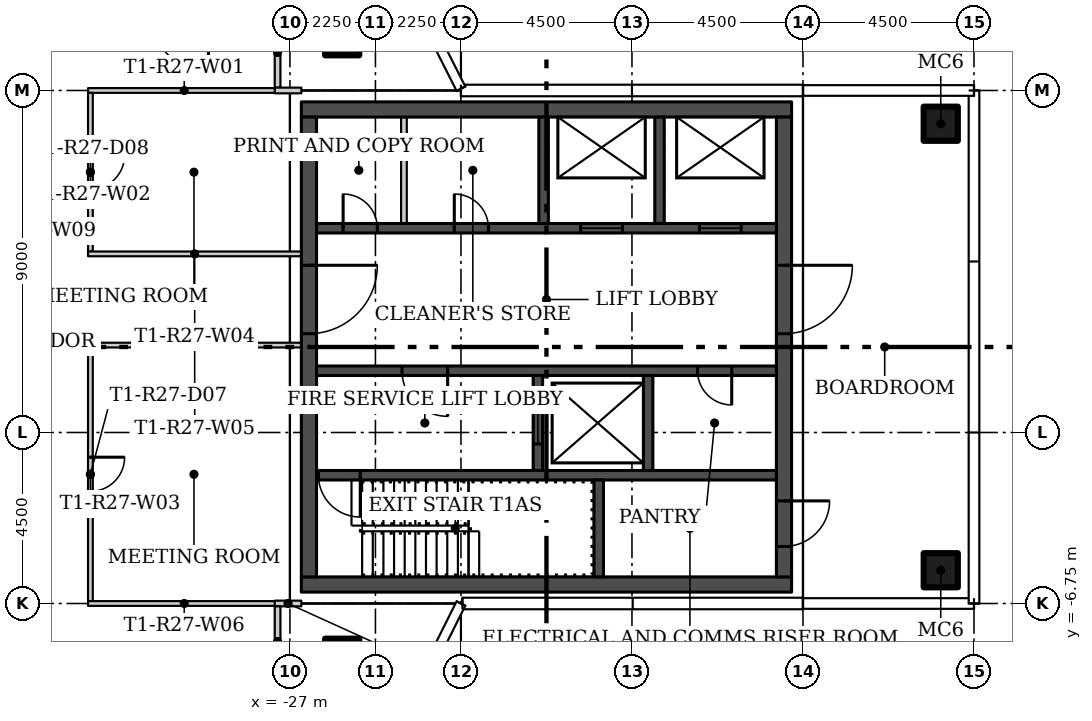
"""IFC4 building model, lengths in metres.
Left out: names, types, materials, properties, quantities, classifications, styles, units other than length and angle.
Written with IfcOpenShell. Run it as: python <this file> out.ifc"""

import sys

from ifc_helpers import new_model, si_unit, direction, frame, frame_2d, origin, origin_2d, place, context, subcontext, project, spatial, rectangle, hollow_rectangle, extrude, element, fill, save


model = new_model("IFC4")
c1 = context("Model", 3, precision=1e-05, world=origin(), true_north=direction((0.0, 1.0)))
c2 = subcontext(c1, "Body", "Model", "MODEL_VIEW")
j1 = project(units=[si_unit("LENGTHUNIT", "METRE"), si_unit("PLANEANGLEUNIT", "RADIAN")], contexts=[c1])
p1 = place(None, origin())
s1 = spatial("IfcSite", under=j1, at=p1, CompositionType="ELEMENT")
p2 = place(p1, origin())
s2 = spatial("IfcBuilding", under=s1, at=p2, CompositionType="ELEMENT")
p3 = place(p2, frame((0.0, 0.0, 249.9)))
s3 = spatial("IfcBuildingStorey", under=s2, at=p3, CompositionType="ELEMENT", Elevation=249.9)
for number, where in (
    (1, (-25.625, 8.125, 0.0)),
    (2, (-25.625, -8.125, 0.0)),
    (3, (-9.875, -5.875, 0.0)),
    (4, (-9.875, 5.875, 0.0)),
):
    element("IfcColumn", number, at=place(p3, frame(where)), inside=s3, PredefinedType="COLUMN", context=c2, shape_type="SweptSolid", body=[
        extrude(hollow_rectangle(XDim=0.9, YDim=0.9, WallThickness=0.036, at=origin_2d()), origin(), (0.0, 0.0, 1.0), 3.55),
    ])
p4 = place(p3, frame((-27.25, 6.75, 0.0), z_axis=(0.0, 0.0, 1.0), x_axis=(-1.0, 0.0, 0.0)))
e5 = element("IfcWall", 5, at=p4, inside=s3, PredefinedType="PARTITIONING", context=c2, shape_type="SweptSolid", body=[
    extrude(rectangle(XDim=5.062, YDim=0.125, at=frame_2d((2.531, 0.0))), origin(), (0.0, 0.0, 1.0), 3.55),
])
p5 = place(p3, frame((-32.25, 6.688, 0.0), z_axis=(0.0, 0.0, 1.0), x_axis=(0.0, -1.0, 0.0)))
e6 = element("IfcWall", 6, at=p5, inside=s3, PredefinedType="PARTITIONING", context=c2, shape_type="SweptSolid", body=[
    extrude(rectangle(XDim=4.175, YDim=0.125, at=frame_2d((2.087, 0.0))), origin(), (0.0, 0.0, 1.0), 3.55),
])
p6 = place(p5, frame((1.637, 0.0, 0.0)))
e7 = element("IfcOpeningElement", 7, at=p6, cuts=e6, PredefinedType="OPENING", context=c2, shape_type="SweptSolid", body=[
    extrude(rectangle(XDim=0.9, YDim=2.1, at=frame_2d((0.45, 1.05))), frame((0.0, 0.073, 0.0), z_axis=(0.0, -1.0, 0.0), x_axis=(1.0, 0.0, 0.0)), (0.0, 0.0, 1.0), 0.145),
])
p7 = place(p3, frame((-32.25, -0.013, 0.0), z_axis=(0.0, 0.0, 1.0), x_axis=(0.0, -1.0, 0.0)))
e8 = element("IfcWall", 8, at=p7, inside=s3, PredefinedType="PARTITIONING", context=c2, shape_type="SweptSolid", body=[
    extrude(rectangle(XDim=6.675, YDim=0.125, at=frame_2d((3.337, 0.0))), origin(), (0.0, 0.0, 1.0), 3.55),
])
p8 = place(p7, frame((2.887, 0.0, 0.0)))
e9 = element("IfcOpeningElement", 9, at=p8, cuts=e8, PredefinedType="OPENING", context=c2, shape_type="SweptSolid", body=[
    extrude(rectangle(XDim=0.9, YDim=2.1, at=frame_2d((0.45, 1.05))), frame((0.0, 0.073, 0.0), z_axis=(0.0, -1.0, 0.0), x_axis=(1.0, 0.0, 0.0)), (0.0, 0.0, 1.0), 0.145),
])
p9 = place(p3, frame((-32.312, 2.45, 0.0)))
e10 = element("IfcWall", 10, at=p9, inside=s3, PredefinedType="PARTITIONING", context=c2, shape_type="SweptSolid", body=[
    extrude(rectangle(XDim=5.613, YDim=0.125, at=frame_2d((2.806, 0.0))), origin(), (0.0, 0.0, 1.0), 3.55),
])
p10 = place(p3, frame((-26.7, 0.05, 0.0), z_axis=(0.0, 0.0, 1.0), x_axis=(-1.0, 0.0, 0.0)))
e11 = element("IfcWall", 11, at=p10, inside=s3, PredefinedType="PARTITIONING", context=c2, shape_type="SweptSolid", body=[
    extrude(rectangle(XDim=5.613, YDim=0.125, at=frame_2d((2.806, 0.0))), origin(), (0.0, 0.0, 1.0), 3.55),
])
p11 = place(p3, frame((-32.312, -6.75, 0.0)))
e12 = element("IfcWall", 12, at=p11, inside=s3, PredefinedType="PARTITIONING", context=c2, shape_type="SweptSolid", body=[
    extrude(rectangle(XDim=5.062, YDim=0.125, at=frame_2d((2.531, 0.0))), origin(), (0.0, 0.0, 1.0), 3.55),
])
p12 = place(p3, frame((-27.4, -6.75, 0.0)))
e13 = element("IfcWall", 13, at=p12, inside=s3, PredefinedType="PARTITIONING", context=c2, shape_type="SweptSolid", body=[
    extrude(rectangle(XDim=0.7, YDim=0.15, at=frame_2d((0.35, 0.0))), origin(), (0.0, 0.0, 1.0), 3.55),
])
for number, where, z_axis, x_axis in (
    (14, (-27.325, -8.675, 0.0), (0.0, 0.0, 1.0), (0.0, 1.0, 0.0)),
    (15, (-27.325, 6.825, 0.0), (0.0, 0.0, 1.0), (0.0, 1.0, 0.0)),
):
    element("IfcWall", number, at=place(p3, frame(where, z_axis=z_axis, x_axis=x_axis)), inside=s3, PredefinedType="PARTITIONING", context=c2, shape_type="SweptSolid", body=[
        extrude(rectangle(XDim=1.85, YDim=0.15, at=frame_2d((0.925, 0.0))), origin(), (0.0, 0.0, 1.0), 3.55),
    ])
p13 = place(p3, frame((-26.7, 6.75, 0.0), z_axis=(0.0, 0.0, 1.0), x_axis=(-1.0, 0.0, 0.0)))
e16 = element("IfcWall", 16, at=p13, inside=s3, PredefinedType="PARTITIONING", context=c2, shape_type="SweptSolid", body=[
    extrude(rectangle(XDim=0.7, YDim=0.15, at=frame_2d((0.35, 0.0))), origin(), (0.0, 0.0, 1.0), 3.55),
])
for number, where in (
    (17, (-26.7, -6.25, 0.0)),
    (18, (-26.7, 6.25, 0.0)),
):
    element("IfcWall", number, at=place(p3, frame(where)), inside=s3, PredefinedType="SHEAR", context=c2, shape_type="SweptSolid", body=[
        extrude(rectangle(XDim=12.9, YDim=0.4, at=frame_2d((6.45, 0.0))), origin(), (0.0, 0.0, 1.0), 3.55),
    ])
p14 = place(p3, frame((-26.5, 6.05, 0.0), z_axis=(0.0, 0.0, 1.0), x_axis=(0.0, -1.0, 0.0)))
e19 = element("IfcWall", 19, at=p14, inside=s3, PredefinedType="SHEAR", context=c2, shape_type="SweptSolid", body=[
    extrude(rectangle(XDim=12.1, YDim=0.4, at=frame_2d((6.05, 0.0))), origin(), (0.0, 0.0, 1.0), 3.55),
])
p15 = place(p14, frame((3.9, 0.0, 0.0)))
e20 = element("IfcOpeningElement", 20, at=p15, cuts=e19, PredefinedType="OPENING", context=c2, shape_type="SweptSolid", body=[
    extrude(rectangle(XDim=1.8, YDim=2.4, at=frame_2d((0.9, 1.2))), frame((0.0, 0.21, 0.0), z_axis=(0.0, -1.0, 0.0), x_axis=(1.0, 0.0, 0.0)), (0.0, 0.0, 1.0), 0.42),
])
p16 = place(p3, frame((-14.0, 6.05, 0.0), z_axis=(0.0, 0.0, 1.0), x_axis=(0.0, -1.0, 0.0)))
e21 = element("IfcWall", 21, at=p16, inside=s3, PredefinedType="SHEAR", context=c2, shape_type="SweptSolid", body=[
    extrude(rectangle(XDim=12.1, YDim=0.4, at=frame_2d((6.05, 0.0))), origin(), (0.0, 0.0, 1.0), 3.55),
])
p17 = place(p16, frame((10.1, 0.0, 0.0)))
e22 = element("IfcOpeningElement", 22, at=p17, cuts=e21, PredefinedType="OPENING", context=c2, shape_type="SweptSolid", body=[
    extrude(rectangle(XDim=1.2, YDim=2.1, at=frame_2d((0.6, 1.05))), frame((0.0, 0.21, 0.0), z_axis=(0.0, -1.0, 0.0), x_axis=(1.0, 0.0, 0.0)), (0.0, 0.0, 1.0), 0.42),
])
p18 = place(p16, frame((3.9, 0.0, 0.0)))
e23 = element("IfcOpeningElement", 23, at=p18, cuts=e21, PredefinedType="OPENING", context=c2, shape_type="SweptSolid", body=[
    extrude(rectangle(XDim=1.8, YDim=2.4, at=frame_2d((0.9, 1.2))), frame((0.0, 0.21, 0.0), z_axis=(0.0, -1.0, 0.0), x_axis=(1.0, 0.0, 0.0)), (0.0, 0.0, 1.0), 0.42),
])
p19 = place(p3, frame((-14.2, -3.375, 0.0), z_axis=(0.0, 0.0, 1.0), x_axis=(-1.0, 0.0, 0.0)))
e24 = element("IfcWall", 24, at=p19, inside=s3, PredefinedType="SHEAR", context=c2, shape_type="SweptSolid", body=[
    extrude(rectangle(XDim=12.1, YDim=0.25, at=frame_2d((6.05, 0.0))), origin(), (0.0, 0.0, 1.0), 3.55),
])
p20 = place(p19, frame((10.95, 0.0, 0.0)))
e25 = element("IfcOpeningElement", 25, at=p20, cuts=e24, PredefinedType="OPENING", context=c2, shape_type="SweptSolid", body=[
    extrude(rectangle(XDim=1.1, YDim=2.1, at=frame_2d((0.55, 1.05))), frame((0.0, 0.135, 0.0), z_axis=(0.0, -1.0, 0.0), x_axis=(1.0, 0.0, 0.0)), (0.0, 0.0, 1.0), 0.27),
])
p21 = place(p3, frame((-18.875, -6.05, 0.0), z_axis=(0.0, 0.0, 1.0), x_axis=(0.0, 1.0, 0.0)))
e26 = element("IfcWall", 26, at=p21, inside=s3, PredefinedType="SHEAR", context=c2, shape_type="SweptSolid", body=[
    extrude(rectangle(XDim=2.55, YDim=0.25, at=frame_2d((1.275, 0.0))), origin(), (0.0, 0.0, 1.0), 3.55),
])
p22 = place(p3, frame((-14.2, -0.625, 0.0), z_axis=(0.0, 0.0, 1.0), x_axis=(-1.0, 0.0, 0.0)))
e27 = element("IfcWall", 27, at=p22, inside=s3, PredefinedType="SHEAR", context=c2, shape_type="SweptSolid", body=[
    extrude(rectangle(XDim=12.1, YDim=0.25, at=frame_2d((6.05, 0.0))), origin(), (0.0, 0.0, 1.0), 3.55),
])
p23 = place(p22, frame((8.65, 0.0, 0.0)))
e28 = element("IfcOpeningElement", 28, at=p23, cuts=e27, PredefinedType="OPENING", context=c2, shape_type="SweptSolid", body=[
    extrude(rectangle(XDim=1.2, YDim=2.1, at=frame_2d((0.6, 1.05))), frame((0.0, 0.135, 0.0), z_axis=(0.0, -1.0, 0.0), x_axis=(1.0, 0.0, 0.0)), (0.0, 0.0, 1.0), 0.27),
])
p24 = place(p22, frame((1.175, 0.0, 0.0)))
e29 = element("IfcOpeningElement", 29, at=p24, cuts=e27, PredefinedType="OPENING", context=c2, shape_type="SweptSolid", body=[
    extrude(rectangle(XDim=0.9, YDim=2.1, at=frame_2d((0.45, 1.05))), frame((0.0, 0.135, 0.0), z_axis=(0.0, -1.0, 0.0), x_axis=(1.0, 0.0, 0.0)), (0.0, 0.0, 1.0), 0.27),
])
p25 = place(p3, frame((-20.475, -3.25, 0.0), z_axis=(0.0, 0.0, 1.0), x_axis=(0.0, 1.0, 0.0)))
e30 = element("IfcWall", 30, at=p25, inside=s3, PredefinedType="SHEAR", context=c2, shape_type="SweptSolid", body=[
    extrude(rectangle(XDim=2.5, YDim=0.25, at=frame_2d((1.25, 0.0))), origin(), (0.0, 0.0, 1.0), 3.55),
])
p26 = place(p25, frame((0.7, 0.0, 0.0)))
e31 = element("IfcOpeningElement", 31, at=p26, cuts=e30, PredefinedType="OPENING", context=c2, shape_type="SweptSolid", body=[
    extrude(rectangle(XDim=1.1, YDim=2.1, at=frame_2d((0.55, 1.05))), frame((0.0, 0.135, 0.0), z_axis=(0.0, -1.0, 0.0), x_axis=(1.0, 0.0, 0.0)), (0.0, 0.0, 1.0), 0.27),
])
p27 = place(p3, frame((-17.575, -3.25, 0.0), z_axis=(0.0, 0.0, 1.0), x_axis=(0.0, 1.0, 0.0)))
e32 = element("IfcWall", 32, at=p27, inside=s3, PredefinedType="SHEAR", context=c2, shape_type="SweptSolid", body=[
    extrude(rectangle(XDim=2.5, YDim=0.25, at=frame_2d((1.25, 0.0))), origin(), (0.0, 0.0, 1.0), 3.55),
])
p28 = place(p3, frame((-26.3, 3.125, 0.0)))
e33 = element("IfcWall", 33, at=p28, inside=s3, PredefinedType="SHEAR", context=c2, shape_type="SweptSolid", body=[
    extrude(rectangle(XDim=12.1, YDim=0.25, at=frame_2d((6.05, 0.0))), origin(), (0.0, 0.0, 1.0), 3.55),
])
p29 = place(p28, frame((6.95, 0.0, 0.0)))
e34 = element("IfcOpeningElement", 34, at=p29, cuts=e33, PredefinedType="OPENING", context=c2, shape_type="SweptSolid", body=[
    extrude(rectangle(XDim=1.1, YDim=2.1, at=frame_2d((0.55, 1.05))), frame((0.0, 0.135, 0.0), z_axis=(0.0, -1.0, 0.0), x_axis=(1.0, 0.0, 0.0)), (0.0, 0.0, 1.0), 0.27),
])
p30 = place(p28, frame((10.075, 0.0, 0.0)))
e35 = element("IfcOpeningElement", 35, at=p30, cuts=e33, PredefinedType="OPENING", context=c2, shape_type="SweptSolid", body=[
    extrude(rectangle(XDim=1.1, YDim=2.1, at=frame_2d((0.55, 1.05))), frame((0.0, 0.135, 0.0), z_axis=(0.0, -1.0, 0.0), x_axis=(1.0, 0.0, 0.0)), (0.0, 0.0, 1.0), 0.27),
])
p31 = place(p28, frame((0.7, 0.0, 0.0)))
e36 = element("IfcOpeningElement", 36, at=p31, cuts=e33, PredefinedType="OPENING", context=c2, shape_type="SweptSolid", body=[
    extrude(rectangle(XDim=0.9, YDim=2.1, at=frame_2d((0.45, 1.05))), frame((0.0, 0.135, 0.0), z_axis=(0.0, -1.0, 0.0), x_axis=(1.0, 0.0, 0.0)), (0.0, 0.0, 1.0), 0.27),
])
p32 = place(p28, frame((3.625, 0.0, 0.0)))
e37 = element("IfcOpeningElement", 37, at=p32, cuts=e33, PredefinedType="OPENING", context=c2, shape_type="SweptSolid", body=[
    extrude(rectangle(XDim=0.9, YDim=2.1, at=frame_2d((0.45, 1.05))), frame((0.0, 0.135, 0.0), z_axis=(0.0, -1.0, 0.0), x_axis=(1.0, 0.0, 0.0)), (0.0, 0.0, 1.0), 0.27),
])
for number, where, z_axis, x_axis in (
    (38, (-20.325, 3.25, 0.0), (0.0, 0.0, 1.0), (0.0, 1.0, 0.0)),
    (39, (-17.275, 3.25, 0.0), (0.0, 0.0, 1.0), (0.0, 1.0, 0.0)),
):
    element("IfcWall", number, at=place(p3, frame(where, z_axis=z_axis, x_axis=x_axis)), inside=s3, PredefinedType="SHEAR", context=c2, shape_type="SweptSolid", body=[
        extrude(rectangle(XDim=2.8, YDim=0.25, at=frame_2d((1.4, 0.0))), origin(), (0.0, 0.0, 1.0), 3.55),
    ])
p33 = place(p3, frame((-24.0, 3.25, 0.0), z_axis=(0.0, 0.0, 1.0), x_axis=(0.0, 1.0, 0.0)))
e40 = element("IfcWall", 40, at=p33, inside=s3, PredefinedType="PARTITIONING", context=c2, shape_type="SweptSolid", body=[
    extrude(rectangle(XDim=2.8, YDim=0.15, at=frame_2d((1.4, 0.0))), origin(), (0.0, 0.0, 1.0), 3.55),
])
p34 = place(p8, origin())
e41 = element("IfcDoor", 41, at=p34, inside=s3, OperationType="SINGLE_SWING_LEFT", PredefinedType="DOOR", context=c2, shape_type="SweptSolid", body=[
    extrude(rectangle(XDim=0.9, YDim=2.1, at=frame_2d((0.45, 1.05))), frame((0.0, 0.025, 0.0), z_axis=(0.0, -1.0, 0.0), x_axis=(1.0, 0.0, 0.0)), (0.0, 0.0, 1.0), 0.05),
])
fill(e9, e41)
p35 = place(p6, origin())
e42 = element("IfcDoor", 42, at=p35, inside=s3, OperationType="SINGLE_SWING_LEFT", PredefinedType="DOOR", context=c2, shape_type="SweptSolid", body=[
    extrude(rectangle(XDim=0.9, YDim=2.1, at=frame_2d((0.45, 1.05))), frame((0.0, 0.025, 0.0), z_axis=(0.0, -1.0, 0.0), x_axis=(1.0, 0.0, 0.0)), (0.0, 0.0, 1.0), 0.05),
])
fill(e7, e42)
p36 = place(p15, origin())
e43 = element("IfcDoor", 43, at=p36, inside=s3, OperationType="DOUBLE_DOOR_SINGLE_SWING", PredefinedType="DOOR", context=c2, shape_type="SweptSolid", body=[
    extrude(rectangle(XDim=1.8, YDim=2.4, at=frame_2d((0.9, 1.2))), frame((0.0, 0.025, 0.0), z_axis=(0.0, -1.0, 0.0), x_axis=(1.0, 0.0, 0.0)), (0.0, 0.0, 1.0), 0.05),
])
fill(e20, e43)
p37 = place(p17, origin())
e44 = element("IfcDoor", 44, at=p37, inside=s3, OperationType="SINGLE_SWING_RIGHT", PredefinedType="DOOR", context=c2, shape_type="SweptSolid", body=[
    extrude(rectangle(XDim=1.2, YDim=2.1, at=frame_2d((0.6, 1.05))), frame((0.0, 0.025, 0.0), z_axis=(0.0, -1.0, 0.0), x_axis=(1.0, 0.0, 0.0)), (0.0, 0.0, 1.0), 0.05),
])
fill(e22, e44)
p38 = place(p18, origin())
e45 = element("IfcDoor", 45, at=p38, inside=s3, OperationType="DOUBLE_DOOR_SINGLE_SWING", PredefinedType="DOOR", context=c2, shape_type="SweptSolid", body=[
    extrude(rectangle(XDim=1.8, YDim=2.4, at=frame_2d((0.9, 1.2))), frame((0.0, 0.025, 0.0), z_axis=(0.0, -1.0, 0.0), x_axis=(1.0, 0.0, 0.0)), (0.0, 0.0, 1.0), 0.05),
])
fill(e23, e45)
p39 = place(p20, origin())
e46 = element("IfcDoor", 46, at=p39, inside=s3, OperationType="SINGLE_SWING_RIGHT", PredefinedType="DOOR", context=c2, shape_type="SweptSolid", body=[
    extrude(rectangle(XDim=1.1, YDim=2.1, at=frame_2d((0.55, 1.05))), frame((0.0, 0.025, 0.0), z_axis=(0.0, -1.0, 0.0), x_axis=(1.0, 0.0, 0.0)), (0.0, 0.0, 1.0), 0.05),
])
fill(e25, e46)
p40 = place(p23, origin())
e47 = element("IfcDoor", 47, at=p40, inside=s3, OperationType="SINGLE_SWING_RIGHT", PredefinedType="DOOR", context=c2, shape_type="SweptSolid", body=[
    extrude(rectangle(XDim=1.2, YDim=2.1, at=frame_2d((0.6, 1.05))), frame((0.0, 0.025, 0.0), z_axis=(0.0, -1.0, 0.0), x_axis=(1.0, 0.0, 0.0)), (0.0, 0.0, 1.0), 0.05),
])
fill(e28, e47)
p41 = place(p24, origin())
e48 = element("IfcDoor", 48, at=p41, inside=s3, OperationType="SINGLE_SWING_LEFT", PredefinedType="DOOR", context=c2, shape_type="SweptSolid", body=[
    extrude(rectangle(XDim=0.9, YDim=2.1, at=frame_2d((0.45, 1.05))), frame((0.0, 0.025, 0.0), z_axis=(0.0, -1.0, 0.0), x_axis=(1.0, 0.0, 0.0)), (0.0, 0.0, 1.0), 0.05),
])
fill(e29, e48)
p42 = place(p26, origin())
e49 = element("IfcDoor", 49, at=p42, inside=s3, OperationType="SLIDING_TO_LEFT", PredefinedType="DOOR", context=c2, shape_type="SweptSolid", body=[
    extrude(rectangle(XDim=1.1, YDim=2.1, at=frame_2d((0.55, 1.05))), frame((0.0, 0.025, 0.0), z_axis=(0.0, -1.0, 0.0), x_axis=(1.0, 0.0, 0.0)), (0.0, 0.0, 1.0), 0.05),
])
fill(e31, e49)
p43 = place(p29, origin())
e50 = element("IfcDoor", 50, at=p43, inside=s3, OperationType="SLIDING_TO_LEFT", PredefinedType="DOOR", context=c2, shape_type="SweptSolid", body=[
    extrude(rectangle(XDim=1.1, YDim=2.1, at=frame_2d((0.55, 1.05))), frame((0.0, 0.025, 0.0), z_axis=(0.0, -1.0, 0.0), x_axis=(1.0, 0.0, 0.0)), (0.0, 0.0, 1.0), 0.05),
])
fill(e34, e50)
p44 = place(p30, origin())
e51 = element("IfcDoor", 51, at=p44, inside=s3, OperationType="SLIDING_TO_LEFT", PredefinedType="DOOR", context=c2, shape_type="SweptSolid", body=[
    extrude(rectangle(XDim=1.1, YDim=2.1, at=frame_2d((0.55, 1.05))), frame((0.0, 0.025, 0.0), z_axis=(0.0, -1.0, 0.0), x_axis=(1.0, 0.0, 0.0)), (0.0, 0.0, 1.0), 0.05),
])
fill(e35, e51)
p45 = place(p31, origin())
e52 = element("IfcDoor", 52, at=p45, inside=s3, OperationType="SINGLE_SWING_LEFT", PredefinedType="DOOR", context=c2, shape_type="SweptSolid", body=[
    extrude(rectangle(XDim=0.9, YDim=2.1, at=frame_2d((0.45, 1.05))), frame((0.0, 0.025, 0.0), z_axis=(0.0, -1.0, 0.0), x_axis=(1.0, 0.0, 0.0)), (0.0, 0.0, 1.0), 0.05),
])
fill(e36, e52)
p46 = place(p32, origin())
e53 = element("IfcDoor", 53, at=p46, inside=s3, OperationType="SINGLE_SWING_LEFT", PredefinedType="DOOR", context=c2, shape_type="SweptSolid", body=[
    extrude(rectangle(XDim=0.9, YDim=2.1, at=frame_2d((0.45, 1.05))), frame((0.0, 0.025, 0.0), z_axis=(0.0, -1.0, 0.0), x_axis=(1.0, 0.0, 0.0)), (0.0, 0.0, 1.0), 0.05),
])
fill(e37, e53)
save(model, sys.argv[1])
